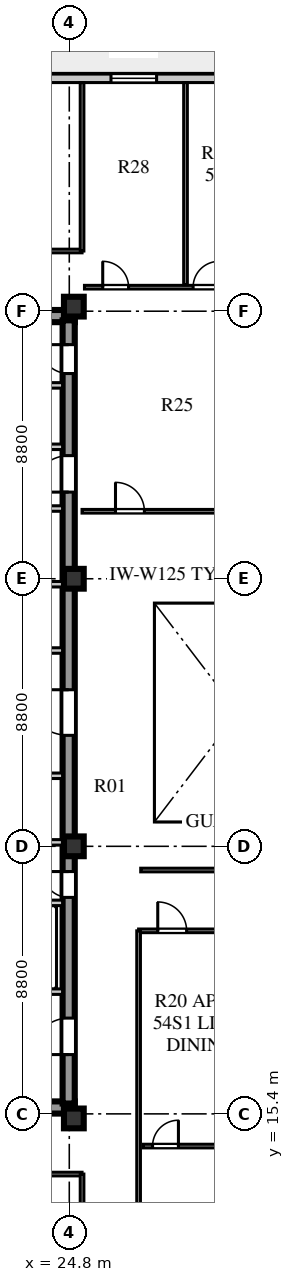
"""IFC4 building model, lengths in metres.
Left out: names, types, materials, properties, quantities, classifications, styles, units other than length and angle.
Written with IfcOpenShell. Run it as: python <this file> out.ifc"""

import sys

from ifc_helpers import new_model, si_unit, direction, frame, frame_2d, origin, origin_2d, place, context, subcontext, project, spatial, rectangle, extrude, element, fill, save


model = new_model("IFC4")
c1 = context("Model", 3, precision=1e-05, world=origin(), true_north=direction((0.0, 1.0)))
c2 = subcontext(c1, "Body", "Model", "MODEL_VIEW")
j1 = project(units=[si_unit("LENGTHUNIT", "METRE"), si_unit("PLANEANGLEUNIT", "RADIAN")], contexts=[c1])
p1 = place(None, origin())
s1 = spatial("IfcSite", under=j1, at=p1, CompositionType="ELEMENT")
p2 = place(p1, origin())
s2 = spatial("IfcBuilding", under=s1, at=p2, CompositionType="ELEMENT")
p3 = place(p2, frame((0.0, 0.0, 221.9)))
s3 = spatial("IfcBuildingStorey", under=s2, at=p3, CompositionType="ELEMENT", Elevation=221.9)
for number, where, z_axis, x_axis in (
    (1, (15.5, 15.61, 0.0), (0.0, 0.0, 1.0), (1.0, 0.0, 0.0)),
    (2, (15.5, 41.64, 0.0), (0.0, 0.0, 1.0), (1.0, 0.0, 0.0)),
):
    element("IfcWall", number, at=place(p3, frame(where, z_axis=z_axis, x_axis=x_axis)), inside=s3, PredefinedType="SHEAR", context=c2, shape_type="SweptSolid", body=[
        extrude(rectangle(XDim=9.48, YDim=0.4, at=frame_2d((4.74, 0.0))), origin(), (0.0, 0.0, 1.0), 3.66),
    ])
p4 = place(p3, frame((24.78, 15.74, 0.0), z_axis=(0.0, 0.0, 1.0), x_axis=(0.0, 1.0, 0.0)))
e3 = element("IfcWall", 3, at=p4, inside=s3, PredefinedType="SHEAR", context=c2, shape_type="SweptSolid", body=[
    extrude(rectangle(XDim=25.76, YDim=0.4, at=frame_2d((12.88, 0.0))), origin(), (0.0, 0.0, 1.0), 3.66),
])
p5 = place(p4, frame((1.61, 0.0, 0.0)))
e4 = element("IfcOpeningElement", 4, at=p5, cuts=e3, PredefinedType="OPENING", context=c2, shape_type="SweptSolid", body=[
    extrude(rectangle(XDim=1.2, YDim=2.1, at=frame_2d((0.6, 1.05))), frame((0.0, 0.21, 0.0), z_axis=(0.0, -1.0, 0.0), x_axis=(1.0, 0.0, 0.0)), (0.0, 0.0, 1.0), 0.42),
])
p6 = place(p4, frame((6.78, 0.0, 0.0)))
e5 = element("IfcOpeningElement", 5, at=p6, cuts=e3, PredefinedType="OPENING", context=c2, shape_type="SweptSolid", body=[
    extrude(rectangle(XDim=0.85, YDim=2.06, at=frame_2d((0.425, 1.03))), frame((0.0, 0.21, 0.0), z_axis=(0.0, -1.0, 0.0), x_axis=(1.0, 0.0, 0.0)), (0.0, 0.0, 1.0), 0.42),
])
p7 = place(p4, frame((12.11, 0.0, 0.0)))
e6 = element("IfcOpeningElement", 6, at=p7, cuts=e3, PredefinedType="OPENING", context=c2, shape_type="SweptSolid", body=[
    extrude(rectangle(XDim=1.5, YDim=2.12, at=frame_2d((0.75, 1.06))), frame((0.0, 0.21, 0.0), z_axis=(0.0, -1.0, 0.0), x_axis=(1.0, 0.0, 0.0)), (0.0, 0.0, 1.0), 0.42),
])
p8 = place(p4, frame((20.11, 0.0, 0.0)))
e7 = element("IfcOpeningElement", 7, at=p8, cuts=e3, PredefinedType="OPENING", context=c2, shape_type="SweptSolid", body=[
    extrude(rectangle(XDim=1.2, YDim=2.12, at=frame_2d((0.6, 1.06))), frame((0.0, 0.21, 0.0), z_axis=(0.0, -1.0, 0.0), x_axis=(1.0, 0.0, 0.0)), (0.0, 0.0, 1.0), 0.42),
])
p9 = place(p4, frame((24.01, 0.0, 0.0)))
e8 = element("IfcOpeningElement", 8, at=p9, cuts=e3, PredefinedType="OPENING", context=c2, shape_type="SweptSolid", body=[
    extrude(rectangle(XDim=0.95, YDim=2.1, at=frame_2d((0.475, 1.05))), frame((0.0, 0.21, 0.0), z_axis=(0.0, -1.0, 0.0), x_axis=(1.0, 0.0, 0.0)), (0.0, 0.0, 1.0), 0.42),
])
for number, where, z_axis, x_axis in (
    (9, (24.95, 15.25, 0.0), (0.0, 0.0, 1.0), (1.0, 0.0, 0.0)),
    (10, (24.95, 24.2, 0.0), (0.0, 0.0, 1.0), (1.0, 0.0, 0.0)),
    (11, (24.95, 33.0, 0.0), (0.0, 0.0, 1.0), (1.0, 0.0, 0.0)),
    (12, (24.95, 41.95, 0.0), (0.0, 0.0, 1.0), (1.0, 0.0, 0.0)),
):
    element("IfcColumn", number, at=place(p3, frame(where, z_axis=z_axis, x_axis=x_axis)), inside=s3, PredefinedType="COLUMN", context=c2, shape_type="SweptSolid", body=[
        extrude(rectangle(XDim=0.65, YDim=0.65, at=origin_2d()), origin(), (0.0, 0.0, 1.0), 3.66),
    ])
p10 = place(p3, frame((45.55, 49.46, 0.0), z_axis=(0.0, 0.0, 1.0), x_axis=(-1.0, 0.0, 0.0)))
e13 = element("IfcWall", 13, at=p10, inside=s3, PredefinedType="STANDARD", context=c2, shape_type="SweptSolid", body=[
    extrude(rectangle(XDim=32.5, YDim=0.28, at=frame_2d((16.25, 0.0))), origin(), (0.0, 0.0, 1.0), 3.66),
])
p11 = place(p10, frame((30.55, 0.0, 0.0)))
e14 = element("IfcOpeningElement", 14, at=p11, cuts=e13, PredefinedType="OPENING", context=c2, shape_type="SweptSolid", body=[
    extrude(rectangle(XDim=1.0, YDim=2.05, at=frame_2d((0.5, 1.025))), frame((0.0, 0.15, 0.0), z_axis=(0.0, -1.0, 0.0), x_axis=(1.0, 0.0, 0.0)), (0.0, 0.0, 1.0), 0.3),
])
p12 = place(p10, frame((24.565, 0.0, 0.8)))
e15 = element("IfcOpeningElement", 15, at=p12, cuts=e13, PredefinedType="OPENING", context=c2, shape_type="SweptSolid", body=[
    extrude(rectangle(XDim=1.8, YDim=2.0, at=frame_2d((0.9, 1.0))), frame((0.0, 0.15, 0.0), z_axis=(0.0, -1.0, 0.0), x_axis=(1.0, 0.0, 0.0)), (0.0, 0.0, 1.0), 0.3),
])
p13 = place(p10, frame((17.878, 0.0, 0.8)))
e16 = element("IfcOpeningElement", 16, at=p13, cuts=e13, PredefinedType="OPENING", context=c2, shape_type="SweptSolid", body=[
    extrude(rectangle(XDim=1.5, YDim=2.0, at=frame_2d((0.75, 1.0))), frame((0.0, 0.15, 0.0), z_axis=(0.0, -1.0, 0.0), x_axis=(1.0, 0.0, 0.0)), (0.0, 0.0, 1.0), 0.3),
])
p14 = place(p10, frame((13.278, 0.0, 0.8)))
e17 = element("IfcOpeningElement", 17, at=p14, cuts=e13, PredefinedType="OPENING", context=c2, shape_type="SweptSolid", body=[
    extrude(rectangle(XDim=1.2, YDim=1.75, at=frame_2d((0.6, 0.875))), frame((0.0, 0.15, 0.0), z_axis=(0.0, -1.0, 0.0), x_axis=(1.0, 0.0, 0.0)), (0.0, 0.0, 1.0), 0.3),
])
p15 = place(p10, frame((4.27, 0.0, 0.8)))
e18 = element("IfcOpeningElement", 18, at=p15, cuts=e13, PredefinedType="OPENING", context=c2, shape_type="SweptSolid", body=[
    extrude(rectangle(XDim=2.4, YDim=2.05, at=frame_2d((1.2, 1.025))), frame((0.0, 0.15, 0.0), z_axis=(0.0, -1.0, 0.0), x_axis=(1.0, 0.0, 0.0)), (0.0, 0.0, 1.0), 0.3),
])
p16 = place(p3, frame((19.64, 19.42, 0.0), z_axis=(0.0, 0.0, 1.0), x_axis=(1.0, 0.0, 0.0)))
e19 = element("IfcWall", 19, at=p16, inside=s3, PredefinedType="SOLIDWALL", context=c2, shape_type="SweptSolid", body=[
    extrude(rectangle(XDim=4.94, YDim=0.18, at=frame_2d((2.47, 0.0))), origin(), (0.0, 0.0, 1.0), 3.66),
])
p17 = place(p16, frame((0.72, 0.0, 0.0)))
e20 = element("IfcOpeningElement", 20, at=p17, cuts=e19, PredefinedType="OPENING", context=c2, shape_type="SweptSolid", body=[
    extrude(rectangle(XDim=1.1, YDim=2.1, at=frame_2d((0.55, 1.05))), frame((0.0, 0.1, 0.0), z_axis=(0.0, -1.0, 0.0), x_axis=(1.0, 0.0, 0.0)), (0.0, 0.0, 1.0), 0.2),
])
p18 = place(p16, frame((3.02, 0.0, 0.0)))
e21 = element("IfcOpeningElement", 21, at=p18, cuts=e19, PredefinedType="OPENING", context=c2, shape_type="SweptSolid", body=[
    extrude(rectangle(XDim=1.1, YDim=2.1, at=frame_2d((0.55, 1.05))), frame((0.0, 0.1, 0.0), z_axis=(0.0, -1.0, 0.0), x_axis=(1.0, 0.0, 0.0)), (0.0, 0.0, 1.0), 0.2),
])
p19 = place(p3, frame((19.64, 22.34, 0.0), z_axis=(0.0, 0.0, 1.0), x_axis=(1.0, 0.0, 0.0)))
e22 = element("IfcWall", 22, at=p19, inside=s3, PredefinedType="SOLIDWALL", context=c2, shape_type="SweptSolid", body=[
    extrude(rectangle(XDim=4.94, YDim=0.18, at=frame_2d((2.47, 0.0))), origin(), (0.0, 0.0, 1.0), 3.66),
])
p20 = place(p3, frame((15.9, 26.52, 0.0), z_axis=(0.0, 0.0, 1.0), x_axis=(1.0, 0.0, 0.0)))
e23 = element("IfcWall", 23, at=p20, inside=s3, PredefinedType="SOLIDWALL", context=c2, shape_type="SweptSolid", body=[
    extrude(rectangle(XDim=8.68, YDim=0.18, at=frame_2d((4.34, 0.0))), origin(), (0.0, 0.0, 1.0), 3.66),
])
p21 = place(p20, frame((3.3, 0.0, 0.0)))
e24 = element("IfcOpeningElement", 24, at=p21, cuts=e23, PredefinedType="OPENING", context=c2, shape_type="SweptSolid", body=[
    extrude(rectangle(XDim=0.95, YDim=2.1, at=frame_2d((0.475, 1.05))), frame((0.0, 0.1, 0.0), z_axis=(0.0, -1.0, 0.0), x_axis=(1.0, 0.0, 0.0)), (0.0, 0.0, 1.0), 0.2),
])
p22 = place(p3, frame((15.9, 24.33, 0.0), z_axis=(0.0, 0.0, 1.0), x_axis=(1.0, 0.0, 0.0)))
e25 = element("IfcWall", 25, at=p22, inside=s3, PredefinedType="SOLIDWALL", context=c2, shape_type="SweptSolid", body=[
    extrude(rectangle(XDim=8.68, YDim=0.18, at=frame_2d((4.34, 0.0))), origin(), (0.0, 0.0, 1.0), 3.06),
])
p23 = place(p3, frame((15.9, 30.64, 0.0), z_axis=(0.0, 0.0, 1.0), x_axis=(1.0, 0.0, 0.0)))
e26 = element("IfcWall", 26, at=p23, inside=s3, PredefinedType="SOLIDWALL", context=c2, shape_type="SweptSolid", body=[
    extrude(rectangle(XDim=8.68, YDim=0.18, at=frame_2d((4.34, 0.0))), origin(), (0.0, 0.0, 1.0), 3.66),
])
p24 = place(p23, frame((3.7, 0.0, 0.0)))
e27 = element("IfcOpeningElement", 27, at=p24, cuts=e26, PredefinedType="OPENING", context=c2, shape_type="SweptSolid", body=[
    extrude(rectangle(XDim=0.95, YDim=2.1, at=frame_2d((0.475, 1.05))), frame((0.0, 0.1, 0.0), z_axis=(0.0, -1.0, 0.0), x_axis=(1.0, 0.0, 0.0)), (0.0, 0.0, 1.0), 0.2),
])
p25 = place(p3, frame((15.9, 32.82, 0.0), z_axis=(0.0, 0.0, 1.0), x_axis=(1.0, 0.0, 0.0)))
e28 = element("IfcWall", 28, at=p25, inside=s3, PredefinedType="SOLIDWALL", context=c2, shape_type="SweptSolid", body=[
    extrude(rectangle(XDim=8.68, YDim=0.18, at=frame_2d((4.34, 0.0))), origin(), (0.0, 0.0, 1.0), 3.06),
])
p26 = place(p3, frame((22.02, 35.31, 0.0), z_axis=(0.0, 0.0, 1.0), x_axis=(1.0, 0.0, 0.0)))
e29 = element("IfcWall", 29, at=p26, inside=s3, PredefinedType="SOLIDWALL", context=c2, shape_type="SweptSolid", body=[
    extrude(rectangle(XDim=2.56, YDim=0.18, at=frame_2d((1.28, 0.0))), origin(), (0.0, 0.0, 1.0), 3.66),
])
p27 = place(p26, frame((0.55, 0.0, 0.0)))
e30 = element("IfcOpeningElement", 30, at=p27, cuts=e29, PredefinedType="OPENING", context=c2, shape_type="SweptSolid", body=[
    extrude(rectangle(XDim=1.0, YDim=2.1, at=frame_2d((0.5, 1.05))), frame((0.0, 0.1, 0.0), z_axis=(0.0, -1.0, 0.0), x_axis=(1.0, 0.0, 0.0)), (0.0, 0.0, 1.0), 0.2),
])
p28 = place(p3, frame((19.64, 37.34, 0.0), z_axis=(0.0, 0.0, 1.0), x_axis=(1.0, 0.0, 0.0)))
e31 = element("IfcWall", 31, at=p28, inside=s3, PredefinedType="SOLIDWALL", context=c2, shape_type="SweptSolid", body=[
    extrude(rectangle(XDim=4.94, YDim=0.18, at=frame_2d((2.47, 0.0))), origin(), (0.0, 0.0, 1.0), 3.66),
])
p29 = place(p28, frame((0.45, 0.0, 0.0)))
e32 = element("IfcOpeningElement", 32, at=p29, cuts=e31, PredefinedType="OPENING", context=c2, shape_type="SweptSolid", body=[
    extrude(rectangle(XDim=1.0, YDim=2.1, at=frame_2d((0.5, 1.05))), frame((0.0, 0.1, 0.0), z_axis=(0.0, -1.0, 0.0), x_axis=(1.0, 0.0, 0.0)), (0.0, 0.0, 1.0), 0.2),
])
p30 = place(p28, frame((2.5, 0.0, 0.0)))
e33 = element("IfcOpeningElement", 33, at=p30, cuts=e31, PredefinedType="OPENING", context=c2, shape_type="SweptSolid", body=[
    extrude(rectangle(XDim=1.0, YDim=2.1, at=frame_2d((0.5, 1.05))), frame((0.0, 0.1, 0.0), z_axis=(0.0, -1.0, 0.0), x_axis=(1.0, 0.0, 0.0)), (0.0, 0.0, 1.0), 0.2),
])
p31 = place(p3, frame((19.64, 39.36, 0.0), z_axis=(0.0, 0.0, 1.0), x_axis=(1.0, 0.0, 0.0)))
e34 = element("IfcWall", 34, at=p31, inside=s3, PredefinedType="SOLIDWALL", context=c2, shape_type="SweptSolid", body=[
    extrude(rectangle(XDim=4.94, YDim=0.18, at=frame_2d((2.47, 0.0))), origin(), (0.0, 0.0, 1.0), 3.66),
])
p32 = place(p3, frame((27.08, 21.42, 0.0), z_axis=(0.0, 0.0, 1.0), x_axis=(1.0, 0.0, 0.0)))
e35 = element("IfcWall", 35, at=p32, inside=s3, PredefinedType="PARTITIONING", context=c2, shape_type="SweptSolid", body=[
    extrude(rectangle(XDim=12.07, YDim=0.12, at=frame_2d((6.035, 0.0))), origin(), (0.0, 0.0, 1.0), 3.31),
])
p33 = place(p32, frame((0.63, 0.0, 0.0)))
e36 = element("IfcOpeningElement", 36, at=p33, cuts=e35, PredefinedType="OPENING", context=c2, shape_type="SweptSolid", body=[
    extrude(rectangle(XDim=0.95, YDim=2.1, at=frame_2d((0.475, 1.05))), frame((0.0, 0.07, 0.0), z_axis=(0.0, -1.0, 0.0), x_axis=(1.0, 0.0, 0.0)), (0.0, 0.0, 1.0), 0.14),
])
p34 = place(p3, frame((27.08, 7.88, 0.0), z_axis=(0.0, 0.0, 1.0), x_axis=(0.0, 1.0, 0.0)))
e37 = element("IfcWall", 37, at=p34, inside=s3, PredefinedType="PARTITIONING", context=c2, shape_type="SweptSolid", body=[
    extrude(rectangle(XDim=13.54, YDim=0.12, at=frame_2d((6.77, 0.0))), origin(), (0.0, 0.0, 1.0), 3.66),
])
p35 = place(p3, frame((27.15, 23.42, 0.0), z_axis=(0.0, 0.0, 1.0), x_axis=(1.0, 0.0, 0.0)))
e38 = element("IfcWall", 38, at=p35, inside=s3, PredefinedType="PARTITIONING", context=c2, shape_type="SweptSolid", body=[
    extrude(rectangle(XDim=6.0, YDim=0.12, at=frame_2d((3.0, 0.0))), origin(), (0.0, 0.0, 1.0), 3.66),
])
p36 = place(p3, frame((25.22, 35.22, 0.0), z_axis=(0.0, 0.0, 1.0), x_axis=(1.0, 0.0, 0.0)))
e39 = element("IfcWall", 39, at=p36, inside=s3, PredefinedType="PARTITIONING", context=c2, shape_type="SweptSolid", body=[
    extrude(rectangle(XDim=9.5, YDim=0.12, at=frame_2d((4.75, 0.0))), origin(), (0.0, 0.0, 1.0), 3.66),
])
p37 = place(p36, frame((1.1, 0.0, 0.0)))
e40 = element("IfcOpeningElement", 40, at=p37, cuts=e39, PredefinedType="OPENING", context=c2, shape_type="SweptSolid", body=[
    extrude(rectangle(XDim=0.95, YDim=2.1, at=frame_2d((0.475, 1.05))), frame((0.0, 0.07, 0.0), z_axis=(0.0, -1.0, 0.0), x_axis=(1.0, 0.0, 0.0)), (0.0, 0.0, 1.0), 0.14),
])
p38 = place(p3, frame((13.4, 13.42, 0.0), z_axis=(0.0, 0.0, 1.0), x_axis=(1.0, 0.0, 0.0)))
e41 = element("IfcWall", 41, at=p38, inside=s3, PredefinedType="PARTITIONING", context=c2, shape_type="SweptSolid", body=[
    extrude(rectangle(XDim=11.82, YDim=0.12, at=frame_2d((5.91, 0.0))), origin(), (0.0, 0.0, 1.0), 3.66),
])
p39 = place(p38, frame((3.2, 0.0, 0.0)))
e42 = element("IfcOpeningElement", 42, at=p39, cuts=e41, PredefinedType="OPENING", context=c2, shape_type="SweptSolid", body=[
    extrude(rectangle(XDim=0.95, YDim=2.08, at=frame_2d((0.475, 1.04))), frame((0.0, 0.07, 0.0), z_axis=(0.0, -1.0, 0.0), x_axis=(1.0, 0.0, 0.0)), (0.0, 0.0, 1.0), 0.14),
])
p40 = place(p3, frame((25.22, 7.88, 0.0), z_axis=(0.0, 0.0, 1.0), x_axis=(0.0, 1.0, 0.0)))
e43 = element("IfcWall", 43, at=p40, inside=s3, PredefinedType="PARTITIONING", context=c2, shape_type="SweptSolid", body=[
    extrude(rectangle(XDim=5.54, YDim=0.12, at=frame_2d((2.77, 0.0))), origin(), (0.0, 0.0, 1.0), 3.21),
])
p41 = place(p3, frame((13.4, 43.78, 0.0), z_axis=(0.0, 0.0, 1.0), x_axis=(1.0, 0.0, 0.0)))
e44 = element("IfcWall", 44, at=p41, inside=s3, PredefinedType="PARTITIONING", context=c2, shape_type="SweptSolid", body=[
    extrude(rectangle(XDim=11.82, YDim=0.12, at=frame_2d((5.91, 0.0))), origin(), (0.0, 0.0, 1.0), 3.66),
])
p42 = place(p41, frame((3.2, 0.0, 0.0)))
e45 = element("IfcOpeningElement", 45, at=p42, cuts=e44, PredefinedType="OPENING", context=c2, shape_type="SweptSolid", body=[
    extrude(rectangle(XDim=0.95, YDim=2.08, at=frame_2d((0.475, 1.04))), frame((0.0, 0.07, 0.0), z_axis=(0.0, -1.0, 0.0), x_axis=(1.0, 0.0, 0.0)), (0.0, 0.0, 1.0), 0.14),
])
p43 = place(p3, frame((25.22, 43.78, 0.0), z_axis=(0.0, 0.0, 1.0), x_axis=(0.0, 1.0, 0.0)))
e46 = element("IfcWall", 46, at=p43, inside=s3, PredefinedType="PARTITIONING", context=c2, shape_type="SweptSolid", body=[
    extrude(rectangle(XDim=5.54, YDim=0.12, at=frame_2d((2.77, 0.0))), origin(), (0.0, 0.0, 1.0), 3.21),
])
p44 = place(p3, frame((27.24, 14.341, 0.0), z_axis=(0.0, 0.0, 1.0), x_axis=(1.0, 0.0, 0.0)))
e47 = element("IfcWall", 47, at=p44, inside=s3, PredefinedType="PARTITIONING", context=c2, shape_type="SweptSolid", body=[
    extrude(rectangle(XDim=11.83, YDim=0.12, at=frame_2d((5.915, 0.0))), origin(), (0.0, 0.0, 1.0), 3.66),
])
p45 = place(p44, frame((0.3, 0.0, 0.0)))
e48 = element("IfcOpeningElement", 48, at=p45, cuts=e47, PredefinedType="OPENING", context=c2, shape_type="SweptSolid", body=[
    extrude(rectangle(XDim=0.85, YDim=2.08, at=frame_2d((0.425, 1.04))), frame((0.0, 0.07, 0.0), z_axis=(0.0, -1.0, 0.0), x_axis=(1.0, 0.0, 0.0)), (0.0, 0.0, 1.0), 0.14),
])
p46 = place(p44, frame((3.135, 0.0, 0.0)))
e49 = element("IfcOpeningElement", 49, at=p46, cuts=e47, PredefinedType="OPENING", context=c2, shape_type="SweptSolid", body=[
    extrude(rectangle(XDim=0.85, YDim=2.08, at=frame_2d((0.425, 1.04))), frame((0.0, 0.07, 0.0), z_axis=(0.0, -1.0, 0.0), x_axis=(1.0, 0.0, 0.0)), (0.0, 0.0, 1.0), 0.14),
])
p47 = place(p3, frame((25.3, 42.59, 0.0), z_axis=(0.0, 0.0, 1.0), x_axis=(1.0, 0.0, 0.0)))
e50 = element("IfcWall", 50, at=p47, inside=s3, PredefinedType="PARTITIONING", context=c2, shape_type="SweptSolid", body=[
    extrude(rectangle(XDim=9.34, YDim=0.12, at=frame_2d((4.67, 0.0))), origin(), (0.0, 0.0, 1.0), 3.66),
])
p48 = place(p47, frame((0.6, 0.0, 0.0)))
e51 = element("IfcOpeningElement", 51, at=p48, cuts=e50, PredefinedType="OPENING", context=c2, shape_type="SweptSolid", body=[
    extrude(rectangle(XDim=0.85, YDim=2.08, at=frame_2d((0.425, 1.04))), frame((0.0, 0.07, 0.0), z_axis=(0.0, -1.0, 0.0), x_axis=(1.0, 0.0, 0.0)), (0.0, 0.0, 1.0), 0.14),
])
p49 = place(p47, frame((3.573, 0.0, 0.0)))
e52 = element("IfcOpeningElement", 52, at=p49, cuts=e50, PredefinedType="OPENING", context=c2, shape_type="SweptSolid", body=[
    extrude(rectangle(XDim=0.85, YDim=2.08, at=frame_2d((0.425, 1.04))), frame((0.0, 0.07, 0.0), z_axis=(0.0, -1.0, 0.0), x_axis=(1.0, 0.0, 0.0)), (0.0, 0.0, 1.0), 0.14),
])
p50 = place(p3, frame((28.623, 42.67, 0.0), z_axis=(0.0, 0.0, 1.0), x_axis=(0.0, 1.0, 0.0)))
e53 = element("IfcWall", 53, at=p50, inside=s3, PredefinedType="PARTITIONING", context=c2, shape_type="SweptSolid", body=[
    extrude(rectangle(XDim=6.65, YDim=0.12, at=frame_2d((3.325, 0.0))), origin(), (0.0, 0.0, 1.0), 3.66),
])
p51 = place(p13, origin())
e54 = element("IfcWindow", 54, at=p51, inside=s3, PartitioningType="SINGLE_PANEL", PredefinedType="WINDOW", context=c2, shape_type="SweptSolid", body=[
    extrude(rectangle(XDim=1.5, YDim=2.0, at=frame_2d((0.75, 1.0))), frame((0.0, 0.03, 0.0), z_axis=(0.0, -1.0, 0.0), x_axis=(1.0, 0.0, 0.0)), (0.0, 0.0, 1.0), 0.06),
])
fill(e16, e54)
p52 = place(p5, frame((1.2, 0.0, 0.0), z_axis=(0.0, 0.0, 1.0), x_axis=(-1.0, 0.0, 0.0)))
e55 = element("IfcDoor", 55, at=p52, inside=s3, OperationType="SINGLE_SWING_RIGHT", PredefinedType="DOOR", context=c2, shape_type="SweptSolid", body=[
    extrude(rectangle(XDim=1.2, YDim=2.1, at=frame_2d((0.6, 1.05))), frame((0.0, 0.025, 0.0), z_axis=(0.0, -1.0, 0.0), x_axis=(1.0, 0.0, 0.0)), (0.0, 0.0, 1.0), 0.05),
])
fill(e4, e55)
p53 = place(p6, frame((0.85, 0.0, 0.0), z_axis=(0.0, 0.0, 1.0), x_axis=(-1.0, 0.0, 0.0)))
e56 = element("IfcDoor", 56, at=p53, inside=s3, OperationType="SINGLE_SWING_LEFT", PredefinedType="DOOR", context=c2, shape_type="SweptSolid", body=[
    extrude(rectangle(XDim=0.85, YDim=2.06, at=frame_2d((0.425, 1.03))), frame((0.0, 0.025, 0.0), z_axis=(0.0, -1.0, 0.0), x_axis=(1.0, 0.0, 0.0)), (0.0, 0.0, 1.0), 0.05),
])
fill(e5, e56)
p54 = place(p7, frame((1.5, 0.0, 0.0), z_axis=(0.0, 0.0, 1.0), x_axis=(-1.0, 0.0, 0.0)))
e57 = element("IfcDoor", 57, at=p54, inside=s3, OperationType="SINGLE_SWING_LEFT", PredefinedType="DOOR", context=c2, shape_type="SweptSolid", body=[
    extrude(rectangle(XDim=1.5, YDim=2.12, at=frame_2d((0.75, 1.06))), frame((0.0, 0.025, 0.0), z_axis=(0.0, -1.0, 0.0), x_axis=(1.0, 0.0, 0.0)), (0.0, 0.0, 1.0), 0.05),
])
fill(e6, e57)
p55 = place(p8, frame((1.2, 0.0, 0.0), z_axis=(0.0, 0.0, 1.0), x_axis=(-1.0, 0.0, 0.0)))
e58 = element("IfcDoor", 58, at=p55, inside=s3, OperationType="SINGLE_SWING_RIGHT", PredefinedType="DOOR", context=c2, shape_type="SweptSolid", body=[
    extrude(rectangle(XDim=1.2, YDim=2.12, at=frame_2d((0.6, 1.06))), frame((0.0, 0.025, 0.0), z_axis=(0.0, -1.0, 0.0), x_axis=(1.0, 0.0, 0.0)), (0.0, 0.0, 1.0), 0.05),
])
fill(e7, e58)
p56 = place(p9, frame((0.95, 0.0, 0.0), z_axis=(0.0, 0.0, 1.0), x_axis=(-1.0, 0.0, 0.0)))
e59 = element("IfcDoor", 59, at=p56, inside=s3, OperationType="SINGLE_SWING_LEFT", PredefinedType="DOOR", context=c2, shape_type="SweptSolid", body=[
    extrude(rectangle(XDim=0.95, YDim=2.1, at=frame_2d((0.475, 1.05))), frame((0.0, 0.025, 0.0), z_axis=(0.0, -1.0, 0.0), x_axis=(1.0, 0.0, 0.0)), (0.0, 0.0, 1.0), 0.05),
])
fill(e8, e59)
p57 = place(p45, frame((0.85, 0.0, 0.0), z_axis=(0.0, 0.0, 1.0), x_axis=(-1.0, 0.0, 0.0)))
e60 = element("IfcDoor", 60, at=p57, inside=s3, OperationType="SINGLE_SWING_LEFT", PredefinedType="DOOR", context=c2, shape_type="SweptSolid", body=[
    extrude(rectangle(XDim=0.85, YDim=2.08, at=frame_2d((0.425, 1.04))), frame((0.0, 0.025, 0.0), z_axis=(0.0, -1.0, 0.0), x_axis=(1.0, 0.0, 0.0)), (0.0, 0.0, 1.0), 0.05),
])
fill(e48, e60)
p58 = place(p33, frame((0.95, 0.0, 0.0), z_axis=(0.0, 0.0, 1.0), x_axis=(-1.0, 0.0, 0.0)))
e61 = element("IfcDoor", 61, at=p58, inside=s3, OperationType="SINGLE_SWING_RIGHT", PredefinedType="DOOR", context=c2, shape_type="SweptSolid", body=[
    extrude(rectangle(XDim=0.95, YDim=2.1, at=frame_2d((0.475, 1.05))), frame((0.0, 0.025, 0.0), z_axis=(0.0, -1.0, 0.0), x_axis=(1.0, 0.0, 0.0)), (0.0, 0.0, 1.0), 0.05),
])
fill(e36, e61)
p59 = place(p48, origin())
e62 = element("IfcDoor", 62, at=p59, inside=s3, OperationType="SINGLE_SWING_LEFT", PredefinedType="DOOR", context=c2, shape_type="SweptSolid", body=[
    extrude(rectangle(XDim=0.85, YDim=2.08, at=frame_2d((0.425, 1.04))), frame((0.0, 0.025, 0.0), z_axis=(0.0, -1.0, 0.0), x_axis=(1.0, 0.0, 0.0)), (0.0, 0.0, 1.0), 0.05),
])
fill(e51, e62)
p60 = place(p49, origin())
e63 = element("IfcDoor", 63, at=p60, inside=s3, OperationType="SINGLE_SWING_RIGHT", PredefinedType="DOOR", context=c2, shape_type="SweptSolid", body=[
    extrude(rectangle(XDim=0.85, YDim=2.08, at=frame_2d((0.425, 1.04))), frame((0.0, 0.025, 0.0), z_axis=(0.0, -1.0, 0.0), x_axis=(1.0, 0.0, 0.0)), (0.0, 0.0, 1.0), 0.05),
])
fill(e52, e63)
p61 = place(p37, origin())
e64 = element("IfcDoor", 64, at=p61, inside=s3, OperationType="SINGLE_SWING_LEFT", PredefinedType="DOOR", context=c2, shape_type="SweptSolid", body=[
    extrude(rectangle(XDim=0.95, YDim=2.1, at=frame_2d((0.475, 1.05))), frame((0.0, 0.025, 0.0), z_axis=(0.0, -1.0, 0.0), x_axis=(1.0, 0.0, 0.0)), (0.0, 0.0, 1.0), 0.05),
])
fill(e40, e64)
save(model, sys.argv[1])
